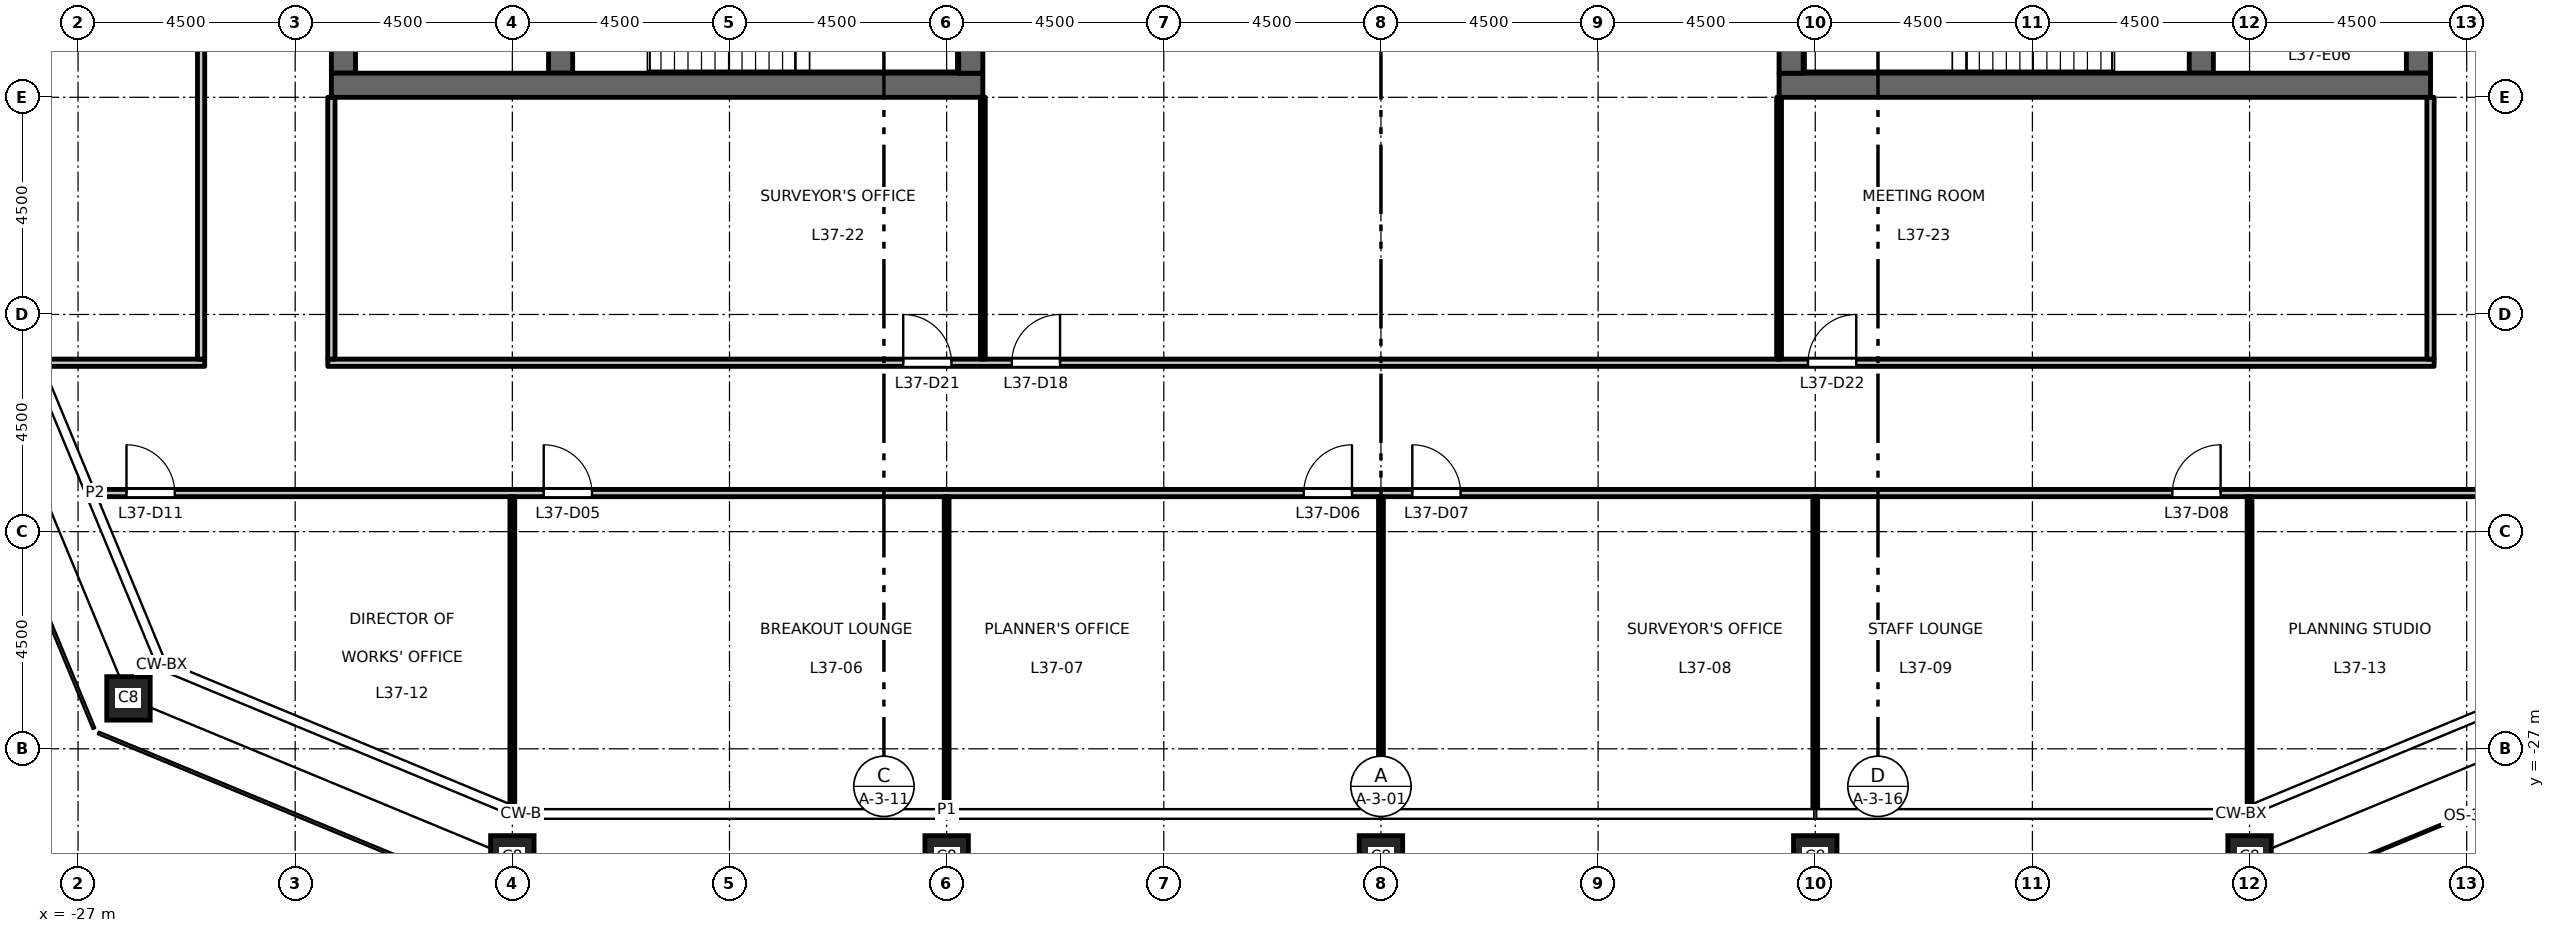
"""IFC4 building model, lengths in metres.
Left out: names, types, materials, properties, quantities, classifications, styles, units other than length and angle.
Written with IfcOpenShell. Run it as: python <this file> out.ifc"""

import sys

from ifc_helpers import new_model, si_unit, direction, frame, frame_2d, origin, origin_2d, place, context, subcontext, project, spatial, rectangle, hollow_rectangle, extrude, element, fill, save


model = new_model("IFC4")
c1 = context("Model", 3, precision=1e-05, world=origin(), true_north=direction((0.0, 1.0)))
c2 = subcontext(c1, "Body", "Model", "MODEL_VIEW")
j1 = project(units=[si_unit("LENGTHUNIT", "METRE"), si_unit("PLANEANGLEUNIT", "RADIAN")], contexts=[c1])
p1 = place(None, origin())
s1 = spatial("IfcSite", under=j1, at=p1, CompositionType="ELEMENT")
p2 = place(p1, origin())
s2 = spatial("IfcBuilding", under=s1, at=p2, CompositionType="ELEMENT")
p3 = place(p2, frame((0.0, 0.0, 172.2)))
s3 = spatial("IfcBuildingStorey", under=s2, at=p3, CompositionType="ELEMENT", Elevation=172.2)
for number, where, z_axis, x_axis in (
    (1, (-18.0, -29.25, 0.0), (0.0, 0.0, 1.0), (1.0, 0.0, 0.0)),
    (2, (-9.0, -29.25, 0.0), (0.0, 0.0, 1.0), (1.0, 0.0, 0.0)),
    (3, (0.0, -29.25, 0.0), (0.0, 0.0, 1.0), (1.0, 0.0, 0.0)),
    (4, (9.0, -29.25, 0.0), (0.0, 0.0, 1.0), (1.0, 0.0, 0.0)),
    (5, (18.0, -29.25, 0.0), (0.0, 0.0, 1.0), (1.0, 0.0, 0.0)),
    (6, (-25.955, -25.955, 0.0), (0.0, 0.0, 1.0), (1.0, 0.0, 0.0)),
):
    element("IfcColumn", number, at=place(p3, frame(where, z_axis=z_axis, x_axis=x_axis)), inside=s3, PredefinedType="COLUMN", context=c2, shape_type="SweptSolid", body=[
        extrude(hollow_rectangle(XDim=0.9, YDim=0.9, WallThickness=0.05, at=origin_2d()), origin(), (0.0, 0.0, 1.0), 4.5),
    ])
p4 = place(p3, frame((-21.5, -13.0, 0.0), z_axis=(0.0, 0.0, 1.0), x_axis=(0.0, 1.0, 0.0)))
e7 = element("IfcWall", 7, at=p4, inside=s3, PredefinedType="SHEAR", context=c2, shape_type="SweptSolid", body=[
    extrude(rectangle(XDim=26.0, YDim=0.5, at=frame_2d((13.0, 0.0))), origin(), (0.0, 0.0, 1.0), 4.35),
])
p5 = place(p4, frame((16.825, 0.0, 0.0)))
e8 = element("IfcOpeningElement", 8, at=p5, cuts=e7, PredefinedType="OPENING", context=c2, shape_type="SweptSolid", body=[
    extrude(rectangle(XDim=1.8, YDim=2.1, at=frame_2d((0.9, 1.05))), frame((0.0, 0.26, 0.0), z_axis=(0.0, -1.0, 0.0), x_axis=(1.0, 0.0, 0.0)), (0.0, 0.0, 1.0), 0.52),
])
p6 = place(p4, frame((7.375, 0.0, 0.0)))
e9 = element("IfcOpeningElement", 9, at=p6, cuts=e7, PredefinedType="OPENING", context=c2, shape_type="SweptSolid", body=[
    extrude(rectangle(XDim=1.8, YDim=2.1, at=frame_2d((0.9, 1.05))), frame((0.0, 0.26, 0.0), z_axis=(0.0, -1.0, 0.0), x_axis=(1.0, 0.0, 0.0)), (0.0, 0.0, 1.0), 0.52),
])
p7 = place(p4, frame((2.65, 0.0, 0.0)))
e10 = element("IfcOpeningElement", 10, at=p7, cuts=e7, PredefinedType="OPENING", context=c2, shape_type="SweptSolid", body=[
    extrude(rectangle(XDim=0.9, YDim=2.1, at=frame_2d((0.45, 1.05))), frame((0.0, 0.26, 0.0), z_axis=(0.0, -1.0, 0.0), x_axis=(1.0, 0.0, 0.0)), (0.0, 0.0, 1.0), 0.52),
])
p8 = place(p3, frame((-17.0, -13.0, 0.0), z_axis=(0.0, 0.0, 1.0), x_axis=(0.0, 1.0, 0.0)))
e11 = element("IfcWall", 11, at=p8, inside=s3, PredefinedType="SHEAR", context=c2, shape_type="SweptSolid", body=[
    extrude(rectangle(XDim=6.575, YDim=0.5, at=frame_2d((3.288, 0.0))), origin(), (0.0, 0.0, 1.0), 4.35),
])
p9 = place(p3, frame((-8.25, -13.25, 0.0), z_axis=(0.0, 0.0, 1.0), x_axis=(-1.0, 0.0, 0.0)))
e12 = element("IfcWall", 12, at=p9, inside=s3, PredefinedType="SHEAR", context=c2, shape_type="SweptSolid", body=[
    extrude(rectangle(XDim=13.5, YDim=0.5, at=frame_2d((6.75, 0.0))), origin(), (0.0, 0.0, 1.0), 4.35),
])
p10 = place(p3, frame((-8.5, -13.0, 0.0), z_axis=(0.0, 0.0, 1.0), x_axis=(0.0, 1.0, 0.0)))
e13 = element("IfcWall", 13, at=p10, inside=s3, PredefinedType="SHEAR", context=c2, shape_type="SweptSolid", body=[
    extrude(rectangle(XDim=26.0, YDim=0.5, at=frame_2d((13.0, 0.0))), origin(), (0.0, 0.0, 1.0), 4.35),
])
p11 = place(p3, frame((21.5, -13.0, 0.0), z_axis=(0.0, 0.0, 1.0), x_axis=(0.0, 1.0, 0.0)))
e14 = element("IfcWall", 14, at=p11, inside=s3, PredefinedType="SHEAR", context=c2, shape_type="SweptSolid", body=[
    extrude(rectangle(XDim=26.0, YDim=0.5, at=frame_2d((13.0, 0.0))), origin(), (0.0, 0.0, 1.0), 4.35),
])
p12 = place(p11, frame((16.825, 0.0, 0.0)))
e15 = element("IfcOpeningElement", 15, at=p12, cuts=e14, PredefinedType="OPENING", context=c2, shape_type="SweptSolid", body=[
    extrude(rectangle(XDim=1.8, YDim=2.1, at=frame_2d((0.9, 1.05))), frame((0.0, 0.26, 0.0), z_axis=(0.0, -1.0, 0.0), x_axis=(1.0, 0.0, 0.0)), (0.0, 0.0, 1.0), 0.52),
])
p13 = place(p11, frame((7.375, 0.0, 0.0)))
e16 = element("IfcOpeningElement", 16, at=p13, cuts=e14, PredefinedType="OPENING", context=c2, shape_type="SweptSolid", body=[
    extrude(rectangle(XDim=1.8, YDim=2.1, at=frame_2d((0.9, 1.05))), frame((0.0, 0.26, 0.0), z_axis=(0.0, -1.0, 0.0), x_axis=(1.0, 0.0, 0.0)), (0.0, 0.0, 1.0), 0.52),
])
p14 = place(p11, frame((22.45, 0.0, 0.0)))
e17 = element("IfcOpeningElement", 17, at=p14, cuts=e14, PredefinedType="OPENING", context=c2, shape_type="SweptSolid", body=[
    extrude(rectangle(XDim=0.9, YDim=2.1, at=frame_2d((0.45, 1.05))), frame((0.0, 0.26, 0.0), z_axis=(0.0, -1.0, 0.0), x_axis=(1.0, 0.0, 0.0)), (0.0, 0.0, 1.0), 0.52),
])
p15 = place(p11, frame((1.7, 0.0, 0.0)))
e18 = element("IfcOpeningElement", 18, at=p15, cuts=e14, PredefinedType="OPENING", context=c2, shape_type="SweptSolid", body=[
    extrude(rectangle(XDim=0.9, YDim=2.1, at=frame_2d((0.45, 1.05))), frame((0.0, 0.26, 0.0), z_axis=(0.0, -1.0, 0.0), x_axis=(1.0, 0.0, 0.0)), (0.0, 0.0, 1.0), 0.52),
])
p16 = place(p3, frame((17.0, -13.0, 0.0), z_axis=(0.0, 0.0, 1.0), x_axis=(0.0, 1.0, 0.0)))
e19 = element("IfcWall", 19, at=p16, inside=s3, PredefinedType="SHEAR", context=c2, shape_type="SweptSolid", body=[
    extrude(rectangle(XDim=6.575, YDim=0.5, at=frame_2d((3.288, 0.0))), origin(), (0.0, 0.0, 1.0), 4.35),
])
p17 = place(p3, frame((8.25, -13.25, 0.0), z_axis=(0.0, 0.0, 1.0), x_axis=(1.0, 0.0, 0.0)))
e20 = element("IfcWall", 20, at=p17, inside=s3, PredefinedType="SHEAR", context=c2, shape_type="SweptSolid", body=[
    extrude(rectangle(XDim=13.5, YDim=0.5, at=frame_2d((6.75, 0.0))), origin(), (0.0, 0.0, 1.0), 4.35),
])
p18 = place(p3, frame((8.5, -13.0, 0.0), z_axis=(0.0, 0.0, 1.0), x_axis=(0.0, 1.0, 0.0)))
e21 = element("IfcWall", 21, at=p18, inside=s3, PredefinedType="SHEAR", context=c2, shape_type="SweptSolid", body=[
    extrude(rectangle(XDim=26.0, YDim=0.5, at=frame_2d((13.0, 0.0))), origin(), (0.0, 0.0, 1.0), 4.35),
])
p19 = place(p3, frame((-26.646, -21.7, 0.0), z_axis=(0.0, 0.0, 1.0), x_axis=(1.0, 0.0, 0.0)))
e22 = element("IfcWall", 22, at=p19, inside=s3, PredefinedType="PARTITIONING", context=c2, shape_type="SweptSolid", body=[
    extrude(rectangle(XDim=53.292, YDim=0.15, at=frame_2d((26.646, 0.0))), origin(), (0.0, 0.0, 1.0), 4.35),
])
p20 = place(p19, frame((9.296, 0.0, 0.0)))
e23 = element("IfcOpeningElement", 23, at=p20, cuts=e22, PredefinedType="OPENING", context=c2, shape_type="SweptSolid", body=[
    extrude(rectangle(XDim=1.0, YDim=2.1, at=frame_2d((0.5, 1.05))), frame((0.0, 0.085, 0.0), z_axis=(0.0, -1.0, 0.0), x_axis=(1.0, 0.0, 0.0)), (0.0, 0.0, 1.0), 0.17),
])
p21 = place(p19, frame((25.046, 0.0, 0.0)))
e24 = element("IfcOpeningElement", 24, at=p21, cuts=e22, PredefinedType="OPENING", context=c2, shape_type="SweptSolid", body=[
    extrude(rectangle(XDim=1.0, YDim=2.1, at=frame_2d((0.5, 1.05))), frame((0.0, 0.085, 0.0), z_axis=(0.0, -1.0, 0.0), x_axis=(1.0, 0.0, 0.0)), (0.0, 0.0, 1.0), 0.17),
])
p22 = place(p19, frame((27.296, 0.0, 0.0)))
e25 = element("IfcOpeningElement", 25, at=p22, cuts=e22, PredefinedType="OPENING", context=c2, shape_type="SweptSolid", body=[
    extrude(rectangle(XDim=1.0, YDim=2.1, at=frame_2d((0.5, 1.05))), frame((0.0, 0.085, 0.0), z_axis=(0.0, -1.0, 0.0), x_axis=(1.0, 0.0, 0.0)), (0.0, 0.0, 1.0), 0.17),
])
p23 = place(p19, frame((43.046, 0.0, 0.0)))
e26 = element("IfcOpeningElement", 26, at=p23, cuts=e22, PredefinedType="OPENING", context=c2, shape_type="SweptSolid", body=[
    extrude(rectangle(XDim=1.0, YDim=2.1, at=frame_2d((0.5, 1.05))), frame((0.0, 0.085, 0.0), z_axis=(0.0, -1.0, 0.0), x_axis=(1.0, 0.0, 0.0)), (0.0, 0.0, 1.0), 0.17),
])
p24 = place(p19, frame((0.65, 0.0, 0.0)))
e27 = element("IfcOpeningElement", 27, at=p24, cuts=e22, PredefinedType="OPENING", context=c2, shape_type="SweptSolid", body=[
    extrude(rectangle(XDim=1.0, YDim=2.1, at=frame_2d((0.5, 1.05))), frame((0.0, 0.085, 0.0), z_axis=(0.0, -1.0, 0.0), x_axis=(1.0, 0.0, 0.0)), (0.0, 0.0, 1.0), 0.17),
])
p25 = place(p19, frame((51.546, 0.0, 0.0)))
e28 = element("IfcOpeningElement", 28, at=p25, cuts=e22, PredefinedType="OPENING", context=c2, shape_type="SweptSolid", body=[
    extrude(rectangle(XDim=1.0, YDim=2.1, at=frame_2d((0.5, 1.05))), frame((0.0, 0.085, 0.0), z_axis=(0.0, -1.0, 0.0), x_axis=(1.0, 0.0, 0.0)), (0.0, 0.0, 1.0), 0.17),
])
p26 = place(p3, frame((-27.764, -19.0, 0.0), z_axis=(0.0, 0.0, 1.0), x_axis=(1.0, 0.0, 0.0)))
e29 = element("IfcWall", 29, at=p26, inside=s3, PredefinedType="PARTITIONING", context=c2, shape_type="SweptSolid", body=[
    extrude(rectangle(XDim=3.389, YDim=0.15, at=frame_2d((1.694, 0.0))), origin(), (0.0, 0.0, 1.0), 4.35),
])
p27 = place(p3, frame((-21.825, -19.0, 0.0), z_axis=(0.0, 0.0, 1.0), x_axis=(1.0, 0.0, 0.0)))
e30 = element("IfcWall", 30, at=p27, inside=s3, PredefinedType="PARTITIONING", context=c2, shape_type="SweptSolid", body=[
    extrude(rectangle(XDim=43.65, YDim=0.15, at=frame_2d((21.825, 0.0))), origin(), (0.0, 0.0, 1.0), 4.35),
])
p28 = place(p27, frame((14.175, 0.0, 0.0)))
e31 = element("IfcOpeningElement", 31, at=p28, cuts=e30, PredefinedType="OPENING", context=c2, shape_type="SweptSolid", body=[
    extrude(rectangle(XDim=1.0, YDim=2.1, at=frame_2d((0.5, 1.05))), frame((0.0, 0.085, 0.0), z_axis=(0.0, -1.0, 0.0), x_axis=(1.0, 0.0, 0.0)), (0.0, 0.0, 1.0), 0.17),
])
p29 = place(p27, frame((11.925, 0.0, 0.0)))
e32 = element("IfcOpeningElement", 32, at=p29, cuts=e30, PredefinedType="OPENING", context=c2, shape_type="SweptSolid", body=[
    extrude(rectangle(XDim=1.0, YDim=2.1, at=frame_2d((0.5, 1.05))), frame((0.0, 0.085, 0.0), z_axis=(0.0, -1.0, 0.0), x_axis=(1.0, 0.0, 0.0)), (0.0, 0.0, 1.0), 0.17),
])
p30 = place(p27, frame((30.675, 0.0, 0.0)))
e33 = element("IfcOpeningElement", 33, at=p30, cuts=e30, PredefinedType="OPENING", context=c2, shape_type="SweptSolid", body=[
    extrude(rectangle(XDim=1.0, YDim=2.1, at=frame_2d((0.5, 1.05))), frame((0.0, 0.085, 0.0), z_axis=(0.0, -1.0, 0.0), x_axis=(1.0, 0.0, 0.0)), (0.0, 0.0, 1.0), 0.17),
])
p31 = place(p3, frame((-24.45, -18.925, 0.0), z_axis=(0.0, 0.0, 1.0), x_axis=(0.0, 1.0, 0.0)))
e34 = element("IfcWall", 34, at=p31, inside=s3, PredefinedType="PARTITIONING", context=c2, shape_type="SweptSolid", body=[
    extrude(rectangle(XDim=37.85, YDim=0.15, at=frame_2d((18.925, 0.0))), origin(), (0.0, 0.0, 1.0), 4.35),
])
p32 = place(p31, frame((36.275, 0.0, 0.0)))
e35 = element("IfcOpeningElement", 35, at=p32, cuts=e34, PredefinedType="OPENING", context=c2, shape_type="SweptSolid", body=[
    extrude(rectangle(XDim=1.0, YDim=2.1, at=frame_2d((0.5, 1.05))), frame((0.0, 0.085, 0.0), z_axis=(0.0, -1.0, 0.0), x_axis=(1.0, 0.0, 0.0)), (0.0, 0.0, 1.0), 0.17),
])
p33 = place(p3, frame((-21.75, -18.925, 0.0), z_axis=(0.0, 0.0, 1.0), x_axis=(0.0, 1.0, 0.0)))
e36 = element("IfcWall", 36, at=p33, inside=s3, PredefinedType="PARTITIONING", context=c2, shape_type="SweptSolid", body=[
    extrude(rectangle(XDim=5.425, YDim=0.15, at=frame_2d((2.712, 0.0))), origin(), (0.0, 0.0, 1.0), 4.35),
])
p34 = place(p3, frame((-18.0, -28.178, 0.0), z_axis=(0.0, 0.0, 1.0), x_axis=(0.0, 1.0, 0.0)))
e37 = element("IfcWall", 37, at=p34, inside=s3, PredefinedType="PARTITIONING", context=c2, shape_type="SweptSolid", body=[
    extrude(rectangle(XDim=6.403, YDim=0.1, at=frame_2d((3.202, 0.0))), origin(), (0.0, 0.0, 1.0), 3.45),
])
p35 = place(p3, frame((-9.0, -28.26, 0.0), z_axis=(0.0, 0.0, 1.0), x_axis=(0.0, 1.0, 0.0)))
e38 = element("IfcWall", 38, at=p35, inside=s3, PredefinedType="PARTITIONING", context=c2, shape_type="SweptSolid", body=[
    extrude(rectangle(XDim=6.485, YDim=0.1, at=frame_2d((3.243, 0.0))), origin(), (0.0, 0.0, 1.0), 3.45),
])
p36 = place(p3, frame((-8.25, -18.925, 0.0), z_axis=(0.0, 0.0, 1.0), x_axis=(0.0, 1.0, 0.0)))
e39 = element("IfcWall", 39, at=p36, inside=s3, PredefinedType="PARTITIONING", context=c2, shape_type="SweptSolid", body=[
    extrude(rectangle(XDim=5.425, YDim=0.1, at=frame_2d((2.712, 0.0))), origin(), (0.0, 0.0, 1.0), 4.35),
])
p37 = place(p3, frame((0.0, -28.26, 0.0), z_axis=(0.0, 0.0, 1.0), x_axis=(0.0, 1.0, 0.0)))
e40 = element("IfcWall", 40, at=p37, inside=s3, PredefinedType="PARTITIONING", context=c2, shape_type="SweptSolid", body=[
    extrude(rectangle(XDim=6.485, YDim=0.1, at=frame_2d((3.243, 0.0))), origin(), (0.0, 0.0, 1.0), 3.45),
])
p38 = place(p3, frame((8.25, -18.925, 0.0), z_axis=(0.0, 0.0, 1.0), x_axis=(0.0, 1.0, 0.0)))
e41 = element("IfcWall", 41, at=p38, inside=s3, PredefinedType="PARTITIONING", context=c2, shape_type="SweptSolid", body=[
    extrude(rectangle(XDim=5.425, YDim=0.1, at=frame_2d((2.712, 0.0))), origin(), (0.0, 0.0, 1.0), 4.35),
])
p39 = place(p3, frame((9.0, -28.26, 0.0), z_axis=(0.0, 0.0, 1.0), x_axis=(0.0, 1.0, 0.0)))
e42 = element("IfcWall", 42, at=p39, inside=s3, PredefinedType="PARTITIONING", context=c2, shape_type="SweptSolid", body=[
    extrude(rectangle(XDim=6.485, YDim=0.1, at=frame_2d((3.243, 0.0))), origin(), (0.0, 0.0, 1.0), 3.45),
])
p40 = place(p3, frame((18.0, -28.178, 0.0), z_axis=(0.0, 0.0, 1.0), x_axis=(0.0, 1.0, 0.0)))
e43 = element("IfcWall", 43, at=p40, inside=s3, PredefinedType="PARTITIONING", context=c2, shape_type="SweptSolid", body=[
    extrude(rectangle(XDim=6.403, YDim=0.1, at=frame_2d((3.202, 0.0))), origin(), (0.0, 0.0, 1.0), 3.45),
])
p41 = place(p3, frame((21.75, -18.925, 0.0), z_axis=(0.0, 0.0, 1.0), x_axis=(0.0, 1.0, 0.0)))
e44 = element("IfcWall", 44, at=p41, inside=s3, PredefinedType="PARTITIONING", context=c2, shape_type="SweptSolid", body=[
    extrude(rectangle(XDim=5.425, YDim=0.15, at=frame_2d((2.712, 0.0))), origin(), (0.0, 0.0, 1.0), 4.35),
])
p42 = place(p20, origin())
e45 = element("IfcDoor", 45, at=p42, inside=s3, OperationType="SINGLE_SWING_LEFT", PredefinedType="DOOR", context=c2, shape_type="SweptSolid", body=[
    extrude(rectangle(XDim=1.0, YDim=2.1, at=frame_2d((0.5, 1.05))), frame((0.0, 0.025, 0.0), z_axis=(0.0, -1.0, 0.0), x_axis=(1.0, 0.0, 0.0)), (0.0, 0.0, 1.0), 0.05),
])
fill(e23, e45)
p43 = place(p21, origin())
e46 = element("IfcDoor", 46, at=p43, inside=s3, OperationType="SINGLE_SWING_RIGHT", PredefinedType="DOOR", context=c2, shape_type="SweptSolid", body=[
    extrude(rectangle(XDim=1.0, YDim=2.1, at=frame_2d((0.5, 1.05))), frame((0.0, 0.025, 0.0), z_axis=(0.0, -1.0, 0.0), x_axis=(1.0, 0.0, 0.0)), (0.0, 0.0, 1.0), 0.05),
])
fill(e24, e46)
p44 = place(p22, origin())
e47 = element("IfcDoor", 47, at=p44, inside=s3, OperationType="SINGLE_SWING_LEFT", PredefinedType="DOOR", context=c2, shape_type="SweptSolid", body=[
    extrude(rectangle(XDim=1.0, YDim=2.1, at=frame_2d((0.5, 1.05))), frame((0.0, 0.025, 0.0), z_axis=(0.0, -1.0, 0.0), x_axis=(1.0, 0.0, 0.0)), (0.0, 0.0, 1.0), 0.05),
])
fill(e25, e47)
p45 = place(p23, origin())
e48 = element("IfcDoor", 48, at=p45, inside=s3, OperationType="SINGLE_SWING_RIGHT", PredefinedType="DOOR", context=c2, shape_type="SweptSolid", body=[
    extrude(rectangle(XDim=1.0, YDim=2.1, at=frame_2d((0.5, 1.05))), frame((0.0, 0.025, 0.0), z_axis=(0.0, -1.0, 0.0), x_axis=(1.0, 0.0, 0.0)), (0.0, 0.0, 1.0), 0.05),
])
fill(e26, e48)
p46 = place(p24, origin())
e49 = element("IfcDoor", 49, at=p46, inside=s3, OperationType="SINGLE_SWING_LEFT", PredefinedType="DOOR", context=c2, shape_type="SweptSolid", body=[
    extrude(rectangle(XDim=1.0, YDim=2.1, at=frame_2d((0.5, 1.05))), frame((0.0, 0.025, 0.0), z_axis=(0.0, -1.0, 0.0), x_axis=(1.0, 0.0, 0.0)), (0.0, 0.0, 1.0), 0.05),
])
fill(e27, e49)
p47 = place(p28, origin())
e50 = element("IfcDoor", 50, at=p47, inside=s3, OperationType="SINGLE_SWING_RIGHT", PredefinedType="DOOR", context=c2, shape_type="SweptSolid", body=[
    extrude(rectangle(XDim=1.0, YDim=2.1, at=frame_2d((0.5, 1.05))), frame((0.0, 0.025, 0.0), z_axis=(0.0, -1.0, 0.0), x_axis=(1.0, 0.0, 0.0)), (0.0, 0.0, 1.0), 0.05),
])
fill(e31, e50)
p48 = place(p29, origin())
e51 = element("IfcDoor", 51, at=p48, inside=s3, OperationType="SINGLE_SWING_LEFT", PredefinedType="DOOR", context=c2, shape_type="SweptSolid", body=[
    extrude(rectangle(XDim=1.0, YDim=2.1, at=frame_2d((0.5, 1.05))), frame((0.0, 0.025, 0.0), z_axis=(0.0, -1.0, 0.0), x_axis=(1.0, 0.0, 0.0)), (0.0, 0.0, 1.0), 0.05),
])
fill(e32, e51)
p49 = place(p30, origin())
e52 = element("IfcDoor", 52, at=p49, inside=s3, OperationType="SINGLE_SWING_RIGHT", PredefinedType="DOOR", context=c2, shape_type="SweptSolid", body=[
    extrude(rectangle(XDim=1.0, YDim=2.1, at=frame_2d((0.5, 1.05))), frame((0.0, 0.025, 0.0), z_axis=(0.0, -1.0, 0.0), x_axis=(1.0, 0.0, 0.0)), (0.0, 0.0, 1.0), 0.05),
])
fill(e33, e52)
save(model, sys.argv[1])
